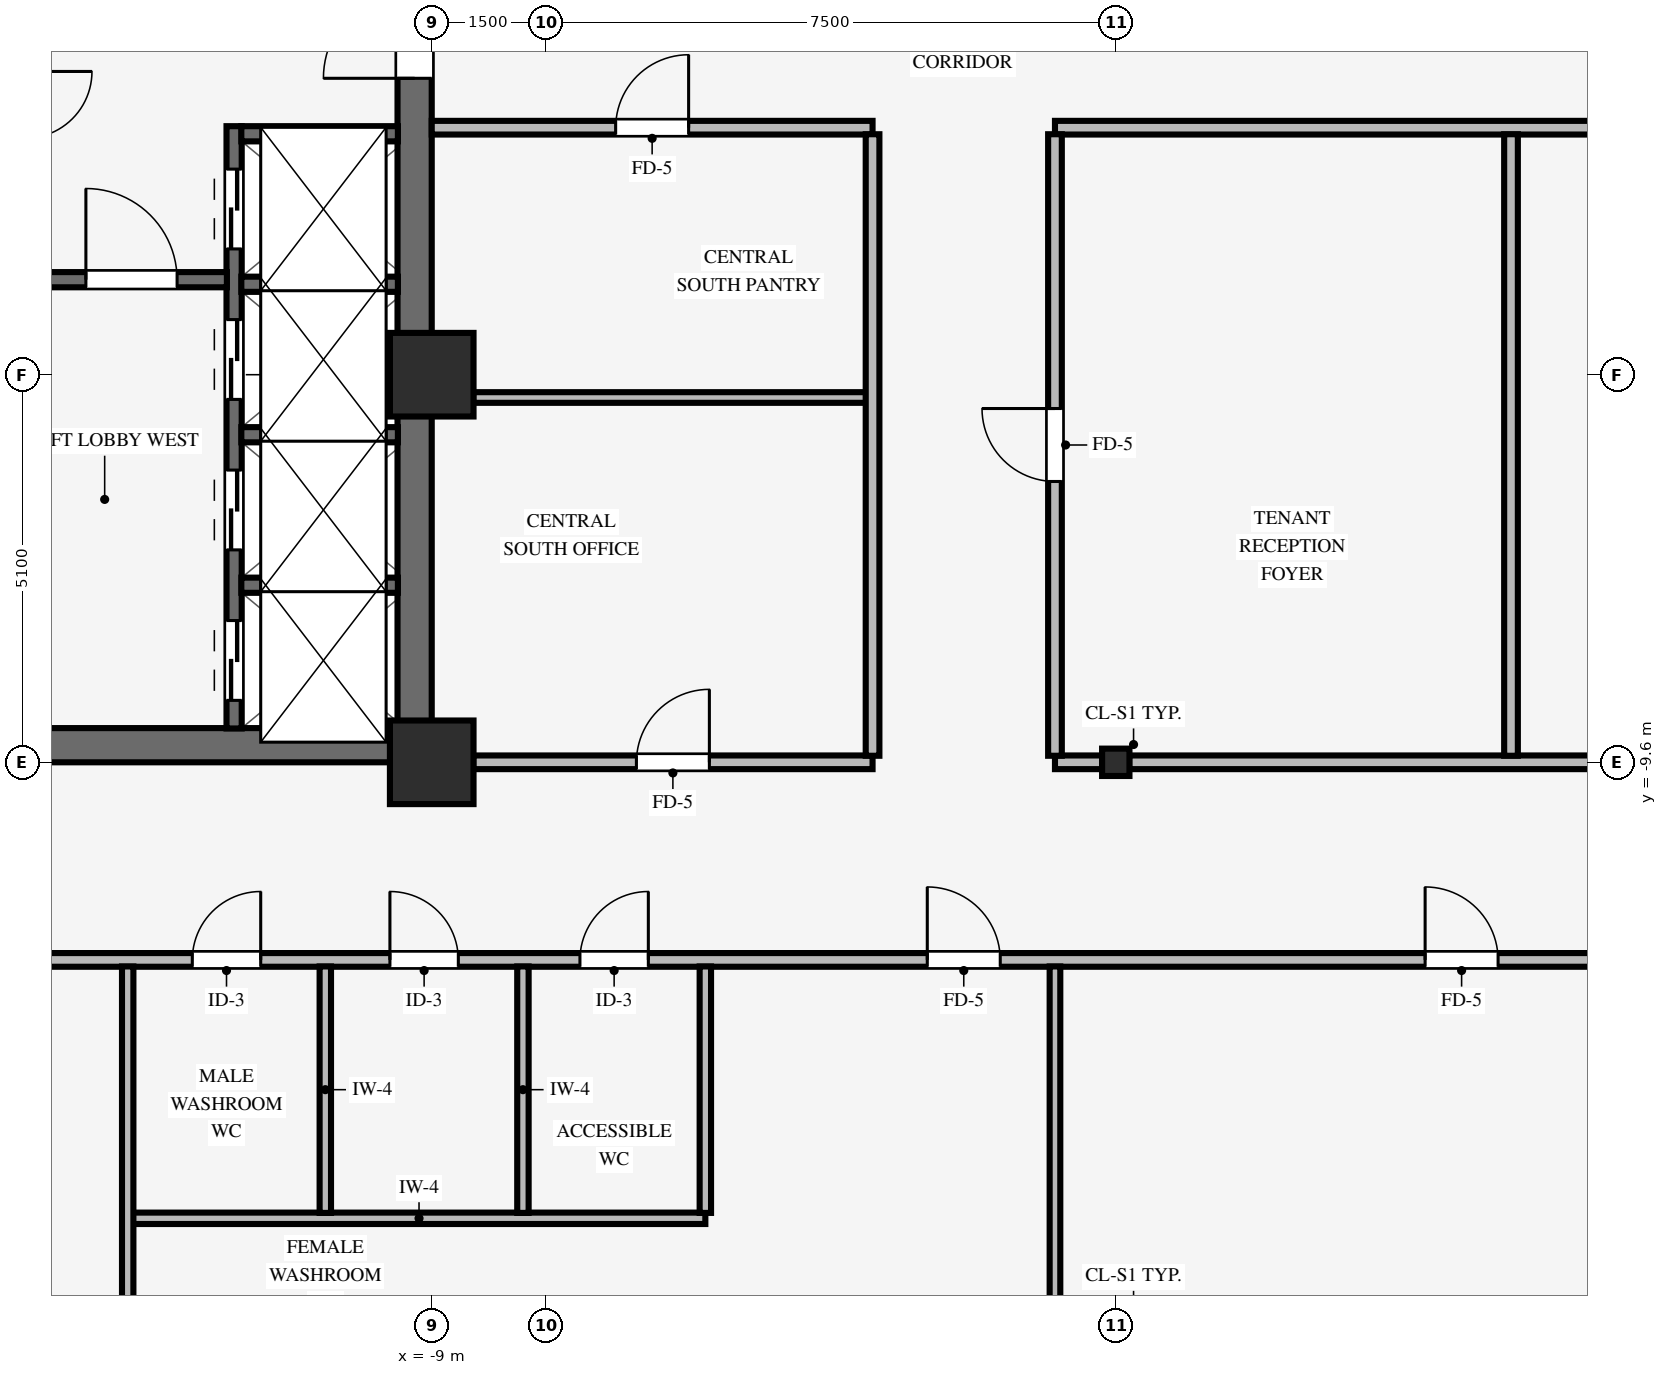
"""IFC4 building model, lengths in metres.
Left out: names, types, materials, properties, quantities, classifications, styles, units other than length and angle.
Written with IfcOpenShell. Run it as: python <this file> out.ifc"""

import sys

from ifc_helpers import new_model, si_unit, direction, frame, frame_2d, origin, origin_2d, place, context, subcontext, project, spatial, rectangle, i_section, extrude, source, transform, mapped, element, fill, save


model = new_model("IFC4")
c1 = context("Model", 3, precision=1e-05, world=origin(), true_north=direction((0.0, 1.0)))
c2 = subcontext(c1, "Body", "Model", "MODEL_VIEW")
j1 = project(units=[si_unit("LENGTHUNIT", "METRE"), si_unit("PLANEANGLEUNIT", "RADIAN")], contexts=[c1])
p1 = place(None, origin())
s1 = spatial("IfcSite", under=j1, at=p1, CompositionType="ELEMENT")
p2 = place(p1, origin())
s2 = spatial("IfcBuilding", under=s1, at=p2, CompositionType="ELEMENT")
p3 = place(p2, frame((0.0, 0.0, 82.35)))
s3 = spatial("IfcBuildingStorey", under=s2, at=p3, CompositionType="ELEMENT", Elevation=82.35)
p4 = place(p3, frame((-17.5, -9.375, 0.0), z_axis=(0.0, 0.0, 1.0), x_axis=(1.0, 0.0, 0.0)))
e1 = element("IfcWall", 1, at=p4, inside=s3, PredefinedType="SHEAR", context=c2, shape_type="SweptSolid", body=[
    extrude(rectangle(XDim=8.5, YDim=0.45, at=frame_2d((4.25, 0.0))), origin(), (0.0, 0.0, 1.0), 3.25),
])
p5 = place(p3, frame((-9.225, -9.155, 0.0), z_axis=(0.0, 0.0, 1.0), x_axis=(0.0, 1.0, 0.0)))
e2 = element("IfcWall", 2, at=p5, inside=s3, PredefinedType="SHEAR", context=c2, shape_type="SweptSolid", body=[
    extrude(rectangle(XDim=18.31, YDim=0.45, at=frame_2d((9.155, 0.0))), origin(), (0.0, 0.0, 1.0), 3.25),
])
p6 = place(p5, frame((8.555, 0.0, 0.0)))
e3 = element("IfcOpeningElement", 3, at=p6, cuts=e2, PredefinedType="OPENING", context=c2, shape_type="SweptSolid", body=[
    extrude(rectangle(XDim=1.2, YDim=2.15, at=frame_2d((0.6, 1.075))), frame((0.0, 0.235, 0.0), z_axis=(0.0, -1.0, 0.0), x_axis=(1.0, 0.0, 0.0)), (0.0, 0.0, 1.0), 0.47),
])
for number, where, z_axis, x_axis in (
    (4, (-9.0, -9.6, 0.0), (0.0, 0.0, 1.0), (1.0, 0.0, 0.0)),
    (5, (-9.0, -4.5, 0.0), (0.0, 0.0, 1.0), (1.0, 0.0, 0.0)),
):
    element("IfcColumn", number, at=place(p3, frame(where, z_axis=z_axis, x_axis=x_axis)), inside=s3, PredefinedType="COLUMN", context=c2, shape_type="SweptSolid", body=[
        extrude(rectangle(XDim=1.1, YDim=1.1, at=origin_2d()), origin(), (0.0, 0.0, 1.0), 3.25),
    ])
p7 = place(p3, frame((0.0, -9.6, 0.0), z_axis=(0.0, 0.0, 1.0), x_axis=(1.0, 0.0, 0.0)))
e6 = element("IfcColumn", 6, at=p7, inside=s3, PredefinedType="COLUMN", context=c2, shape_type="SweptSolid", body=[
    extrude(i_section(OverallWidth=0.36, OverallDepth=0.36, WebThickness=0.021, FlangeThickness=0.021, FilletRadius=0.018, at=origin_2d()), origin(), (0.0, 0.0, 1.0), 3.25),
])
p8 = place(p3, frame((-11.6, -9.155, 0.0), z_axis=(0.0, 0.0, 1.0), x_axis=(0.0, 1.0, 0.0)))
e7 = element("IfcWall", 7, at=p8, inside=s3, PredefinedType="SHEAR", context=c2, shape_type="SweptSolid", body=[
    extrude(rectangle(XDim=7.925, YDim=0.2, at=frame_2d((3.962, 0.0))), origin(), (0.0, 0.0, 1.0), 3.25),
])
p9 = place(p8, frame((0.37, 0.0, 0.0)))
e8 = element("IfcOpeningElement", 8, at=p9, cuts=e7, PredefinedType="OPENING", context=c2, shape_type="SweptSolid", body=[
    extrude(rectangle(XDim=1.05, YDim=2.15, at=frame_2d((0.525, 1.075))), frame((0.0, 0.11, 0.0), z_axis=(0.0, -1.0, 0.0), x_axis=(1.0, 0.0, 0.0)), (0.0, 0.0, 1.0), 0.22),
])
p10 = place(p8, frame((2.35, 0.0, 0.0)))
e9 = element("IfcOpeningElement", 9, at=p10, cuts=e7, PredefinedType="OPENING", context=c2, shape_type="SweptSolid", body=[
    extrude(rectangle(XDim=1.05, YDim=2.15, at=frame_2d((0.525, 1.075))), frame((0.0, 0.11, 0.0), z_axis=(0.0, -1.0, 0.0), x_axis=(1.0, 0.0, 0.0)), (0.0, 0.0, 1.0), 0.22),
])
p11 = place(p8, frame((4.33, 0.0, 0.0)))
e10 = element("IfcOpeningElement", 10, at=p11, cuts=e7, PredefinedType="OPENING", context=c2, shape_type="SweptSolid", body=[
    extrude(rectangle(XDim=1.05, YDim=2.15, at=frame_2d((0.525, 1.075))), frame((0.0, 0.11, 0.0), z_axis=(0.0, -1.0, 0.0), x_axis=(1.0, 0.0, 0.0)), (0.0, 0.0, 1.0), 0.22),
])
p12 = place(p8, frame((6.31, 0.0, 0.0)))
e11 = element("IfcOpeningElement", 11, at=p12, cuts=e7, PredefinedType="OPENING", context=c2, shape_type="SweptSolid", body=[
    extrude(rectangle(XDim=1.05, YDim=2.15, at=frame_2d((0.525, 1.075))), frame((0.0, 0.11, 0.0), z_axis=(0.0, -1.0, 0.0), x_axis=(1.0, 0.0, 0.0)), (0.0, 0.0, 1.0), 0.22),
])
p13 = place(p3, frame((-14.255, -3.25, 0.0), z_axis=(0.0, 0.0, 1.0), x_axis=(1.0, 0.0, 0.0)))
e12 = element("IfcWall", 12, at=p13, inside=s3, PredefinedType="SHEAR", context=c2, shape_type="SweptSolid", body=[
    extrude(rectangle(XDim=2.56, YDim=0.2, at=frame_2d((1.28, 0.0))), origin(), (0.0, 0.0, 1.0), 3.25),
])
p14 = place(p13, frame((0.705, 0.0, 0.0)))
e13 = element("IfcOpeningElement", 13, at=p14, cuts=e12, PredefinedType="OPENING", context=c2, shape_type="SweptSolid", body=[
    extrude(rectangle(XDim=1.2, YDim=2.15, at=frame_2d((0.6, 1.075))), frame((0.0, 0.11, 0.0), z_axis=(0.0, -1.0, 0.0), x_axis=(1.0, 0.0, 0.0)), (0.0, 0.0, 1.0), 0.22),
])
for number, where, z_axis, x_axis in (
    (14, (-11.505, -7.27, 0.0), (0.0, 0.0, 1.0), (1.0, 0.0, 0.0)),
    (15, (-11.505, -5.29, 0.0), (0.0, 0.0, 1.0), (1.0, 0.0, 0.0)),
    (16, (-11.505, -3.31, 0.0), (0.0, 0.0, 1.0), (1.0, 0.0, 0.0)),
    (17, (-11.505, -1.33, 0.0), (0.0, 0.0, 1.0), (1.0, 0.0, 0.0)),
):
    element("IfcWall", number, at=place(p3, frame(where, z_axis=z_axis, x_axis=x_axis)), inside=s3, PredefinedType="SHEAR", context=c2, shape_type="SweptSolid", body=[
        extrude(rectangle(XDim=2.06, YDim=0.2, at=frame_2d((1.03, 0.0))), origin(), (0.0, 0.0, 1.0), 3.25),
    ])
p15 = place(p3, frame((-12.934, -15.6, 0.0), z_axis=(0.0, 0.0, 1.0), x_axis=(1.0, 0.0, 0.0)))
e18 = element("IfcWall", 18, at=p15, inside=s3, PredefinedType="PARTITIONING", context=c2, shape_type="SweptSolid", body=[
    extrude(rectangle(XDim=7.534, YDim=0.15, at=frame_2d((3.767, 0.0))), origin(), (0.0, 0.0, 1.0), 3.24),
])
p16 = place(p3, frame((-15.0, -12.2, 0.0), z_axis=(0.0, 0.0, 1.0), x_axis=(1.0, 0.0, 0.0)))
e19 = element("IfcWall", 19, at=p16, inside=s3, PredefinedType="PARTITIONING", context=c2, shape_type="SweptSolid", body=[
    extrude(rectangle(XDim=30.0, YDim=0.18, at=frame_2d((15.0, 0.0))), origin(), (0.0, 0.0, 1.0), 3.24),
])
p17 = place(p16, frame((19.07, 0.0, 0.0)))
e20 = element("IfcOpeningElement", 20, at=p17, cuts=e19, PredefinedType="OPENING", context=c2, shape_type="SweptSolid", body=[
    extrude(rectangle(XDim=0.96, YDim=2.1, at=frame_2d((0.48, 1.05))), frame((0.0, 0.1, 0.0), z_axis=(0.0, -1.0, 0.0), x_axis=(1.0, 0.0, 0.0)), (0.0, 0.0, 1.0), 0.2),
])
p18 = place(p16, frame((5.45, 0.0, 0.0)))
e21 = element("IfcOpeningElement", 21, at=p18, cuts=e19, PredefinedType="OPENING", context=c2, shape_type="SweptSolid", body=[
    extrude(rectangle(XDim=0.9, YDim=2.1, at=frame_2d((0.45, 1.05))), frame((0.0, 0.1, 0.0), z_axis=(0.0, -1.0, 0.0), x_axis=(1.0, 0.0, 0.0)), (0.0, 0.0, 1.0), 0.2),
])
p19 = place(p16, frame((2.85, 0.0, 0.0)))
e22 = element("IfcOpeningElement", 22, at=p19, cuts=e19, PredefinedType="OPENING", context=c2, shape_type="SweptSolid", body=[
    extrude(rectangle(XDim=0.9, YDim=2.1, at=frame_2d((0.45, 1.05))), frame((0.0, 0.1, 0.0), z_axis=(0.0, -1.0, 0.0), x_axis=(1.0, 0.0, 0.0)), (0.0, 0.0, 1.0), 0.2),
])
p20 = place(p16, frame((12.52, 0.0, 0.0)))
e23 = element("IfcOpeningElement", 23, at=p20, cuts=e19, PredefinedType="OPENING", context=c2, shape_type="SweptSolid", body=[
    extrude(rectangle(XDim=0.96, YDim=2.1, at=frame_2d((0.48, 1.05))), frame((0.0, 0.1, 0.0), z_axis=(0.0, -1.0, 0.0), x_axis=(1.0, 0.0, 0.0)), (0.0, 0.0, 1.0), 0.2),
])
p21 = place(p16, frame((7.95, 0.0, 0.0)))
e24 = element("IfcOpeningElement", 24, at=p21, cuts=e19, PredefinedType="OPENING", context=c2, shape_type="SweptSolid", body=[
    extrude(rectangle(XDim=0.9, YDim=2.1, at=frame_2d((0.45, 1.05))), frame((0.0, 0.1, 0.0), z_axis=(0.0, -1.0, 0.0), x_axis=(1.0, 0.0, 0.0)), (0.0, 0.0, 1.0), 0.2),
])
p22 = place(p3, frame((-8.454, -9.6, 0.0), z_axis=(0.0, 0.0, 1.0), x_axis=(1.0, 0.0, 0.0)))
e25 = element("IfcWall", 25, at=p22, inside=s3, PredefinedType="PARTITIONING", context=c2, shape_type="SweptSolid", body=[
    extrude(rectangle(XDim=5.254, YDim=0.18, at=frame_2d((2.627, 0.0))), origin(), (0.0, 0.0, 1.0), 2.285),
])
p23 = place(p22, frame((2.147, 0.0, 0.0)))
e26 = element("IfcOpeningElement", 26, at=p23, cuts=e25, PredefinedType="OPENING", context=c2, shape_type="SweptSolid", body=[
    extrude(rectangle(XDim=0.96, YDim=2.1, at=frame_2d((0.48, 1.05))), frame((0.0, 0.1, 0.0), z_axis=(0.0, -1.0, 0.0), x_axis=(1.0, 0.0, 0.0)), (0.0, 0.0, 1.0), 0.2),
])
p24 = place(p3, frame((-0.8, -9.6, 0.0), z_axis=(0.0, 0.0, 1.0), x_axis=(1.0, 0.0, 0.0)))
e27 = element("IfcWall", 27, at=p24, inside=s3, PredefinedType="PARTITIONING", context=c2, shape_type="SweptSolid", body=[
    extrude(rectangle(XDim=0.624, YDim=0.18, at=frame_2d((0.312, 0.0))), origin(), (0.0, 0.0, 1.0), 2.285),
])
p25 = place(p3, frame((0.176, -9.6, 0.0), z_axis=(0.0, 0.0, 1.0), x_axis=(1.0, 0.0, 0.0)))
e28 = element("IfcWall", 28, at=p25, inside=s3, PredefinedType="PARTITIONING", context=c2, shape_type="SweptSolid", body=[
    extrude(rectangle(XDim=8.278, YDim=0.18, at=frame_2d((4.139, 0.0))), origin(), (0.0, 0.0, 1.0), 2.285),
])
p26 = place(p3, frame((-8.454, -4.8, 0.0), z_axis=(0.0, 0.0, 1.0), x_axis=(1.0, 0.0, 0.0)))
e29 = element("IfcWall", 29, at=p26, inside=s3, PredefinedType="PARTITIONING", context=c2, shape_type="SweptSolid", body=[
    extrude(rectangle(XDim=5.168, YDim=0.14, at=frame_2d((2.584, 0.0))), origin(), (0.0, 0.0, 1.0), 2.618),
])
p27 = place(p3, frame((-9.0, -1.25, 0.0), z_axis=(0.0, 0.0, 1.0), x_axis=(1.0, 0.0, 0.0)))
e30 = element("IfcWall", 30, at=p27, inside=s3, PredefinedType="PARTITIONING", context=c2, shape_type="SweptSolid", body=[
    extrude(rectangle(XDim=5.8, YDim=0.18, at=frame_2d((2.9, 0.0))), origin(), (0.0, 0.0, 1.0), 3.24),
])
p28 = place(p27, frame((2.42, 0.0, 0.0)))
e31 = element("IfcOpeningElement", 31, at=p28, cuts=e30, PredefinedType="OPENING", context=c2, shape_type="SweptSolid", body=[
    extrude(rectangle(XDim=0.96, YDim=2.1, at=frame_2d((0.48, 1.05))), frame((0.0, 0.1, 0.0), z_axis=(0.0, -1.0, 0.0), x_axis=(1.0, 0.0, 0.0)), (0.0, 0.0, 1.0), 0.2),
])
p29 = place(p3, frame((-0.8, -1.25, 0.0), z_axis=(0.0, 0.0, 1.0), x_axis=(1.0, 0.0, 0.0)))
e32 = element("IfcWall", 32, at=p29, inside=s3, PredefinedType="PARTITIONING", context=c2, shape_type="SweptSolid", body=[
    extrude(rectangle(XDim=9.8, YDim=0.18, at=frame_2d((4.9, 0.0))), origin(), (0.0, 0.0, 1.0), 3.24),
])
p30 = place(p29, frame((7.42, 0.0, 0.0)))
e33 = element("IfcOpeningElement", 33, at=p30, cuts=e32, PredefinedType="OPENING", context=c2, shape_type="SweptSolid", body=[
    extrude(rectangle(XDim=0.96, YDim=2.1, at=frame_2d((0.48, 1.05))), frame((0.0, 0.1, 0.0), z_axis=(0.0, -1.0, 0.0), x_axis=(1.0, 0.0, 0.0)), (0.0, 0.0, 1.0), 0.2),
])
p31 = place(p3, frame((-13.0, -22.86, 0.0), z_axis=(0.0, 0.0, 1.0), x_axis=(0.0, 1.0, 0.0)))
e34 = element("IfcWall", 34, at=p31, inside=s3, PredefinedType="PARTITIONING", context=c2, shape_type="SweptSolid", body=[
    extrude(rectangle(XDim=10.574, YDim=0.15, at=frame_2d((5.287, 0.0))), origin(), (0.0, 0.0, 1.0), 3.24),
])
for number, where, z_axis, x_axis in (
    (35, (-10.4, -15.529, 0.0), (0.0, 0.0, 1.0), (0.0, 1.0, 0.0)),
    (36, (-7.8, -15.529, 0.0), (0.0, 0.0, 1.0), (0.0, 1.0, 0.0)),
    (37, (-5.4, -15.529, 0.0), (0.0, 0.0, 1.0), (0.0, 1.0, 0.0)),
):
    element("IfcWall", number, at=place(p3, frame(where, z_axis=z_axis, x_axis=x_axis)), inside=s3, PredefinedType="PARTITIONING", context=c2, shape_type="SweptSolid", body=[
        extrude(rectangle(XDim=3.243, YDim=0.15, at=frame_2d((1.622, 0.0))), origin(), (0.0, 0.0, 1.0), 3.24),
    ])
p32 = place(p3, frame((-3.2, -9.514, 0.0), z_axis=(0.0, 0.0, 1.0), x_axis=(0.0, 1.0, 0.0)))
e38 = element("IfcWall", 38, at=p32, inside=s3, PredefinedType="PARTITIONING", context=c2, shape_type="SweptSolid", body=[
    extrude(rectangle(XDim=8.178, YDim=0.18, at=frame_2d((4.089, 0.0))), origin(), (0.0, 0.0, 1.0), 3.24),
])
p33 = place(p3, frame((-0.8, -22.86, 0.0), z_axis=(0.0, 0.0, 1.0), x_axis=(0.0, 1.0, 0.0)))
e39 = element("IfcWall", 39, at=p33, inside=s3, PredefinedType="PARTITIONING", context=c2, shape_type="SweptSolid", body=[
    extrude(rectangle(XDim=10.574, YDim=0.14, at=frame_2d((5.287, 0.0))), origin(), (0.0, 0.0, 1.0), 3.24),
])
p34 = place(p3, frame((-0.8, -9.514, 0.0), z_axis=(0.0, 0.0, 1.0), x_axis=(0.0, 1.0, 0.0)))
e40 = element("IfcWall", 40, at=p34, inside=s3, PredefinedType="PARTITIONING", context=c2, shape_type="SweptSolid", body=[
    extrude(rectangle(XDim=8.178, YDim=0.18, at=frame_2d((4.089, 0.0))), origin(), (0.0, 0.0, 1.0), 3.24),
])
p35 = place(p34, frame((3.609, 0.0, 0.0)))
e41 = element("IfcOpeningElement", 41, at=p35, cuts=e40, PredefinedType="OPENING", context=c2, shape_type="SweptSolid", body=[
    extrude(rectangle(XDim=0.96, YDim=2.1, at=frame_2d((0.48, 1.05))), frame((0.0, 0.1, 0.0), z_axis=(0.0, -1.0, 0.0), x_axis=(1.0, 0.0, 0.0)), (0.0, 0.0, 1.0), 0.2),
])
p36 = place(p3, frame((5.2, -9.514, 0.0), z_axis=(0.0, 0.0, 1.0), x_axis=(0.0, 1.0, 0.0)))
e42 = element("IfcWall", 42, at=p36, inside=s3, PredefinedType="PARTITIONING", context=c2, shape_type="SweptSolid", body=[
    extrude(rectangle(XDim=8.178, YDim=0.18, at=frame_2d((4.089, 0.0))), origin(), (0.0, 0.0, 1.0), 3.24),
])
m1 = source(origin(), c2, "Body", "SweptSolid", [
    extrude(rectangle(XDim=1.2, YDim=2.15, at=frame_2d((0.6, 1.075))), frame((0.0, 0.025, 0.0), z_axis=(0.0, -1.0, 0.0), x_axis=(1.0, 0.0, 0.0)), (0.0, 0.0, 1.0), 0.05),
])
p37 = place(p14, origin())
e43 = element("IfcDoor", 43, at=p37, inside=s3, OperationType="SINGLE_SWING_LEFT", PredefinedType="DOOR", context=c2, shape_type="MappedRepresentation", body=[
    mapped(m1, transform((0.0, 0.0, 0.0), scale=1.0)),
])
fill(e13, e43)
p38 = place(p6, origin())
e44 = element("IfcDoor", 44, at=p38, inside=s3, OperationType="SINGLE_SWING_LEFT", PredefinedType="DOOR", context=c2, shape_type="MappedRepresentation", body=[
    mapped(m1, transform((0.0, 0.0, 0.0), scale=1.0)),
])
fill(e3, e44)
m2 = source(origin(), c2, "Body", "SweptSolid", [
    extrude(rectangle(XDim=1.05, YDim=2.15, at=frame_2d((0.525, 1.075))), frame((0.0, 0.025, 0.0), z_axis=(0.0, -1.0, 0.0), x_axis=(1.0, 0.0, 0.0)), (0.0, 0.0, 1.0), 0.05),
])
p39 = place(p9, origin())
e45 = element("IfcDoor", 45, at=p39, inside=s3, OperationType="DOUBLE_DOOR_SLIDING", PredefinedType="DOOR", context=c2, shape_type="MappedRepresentation", body=[
    mapped(m2, transform((0.0, 0.0, 0.0), scale=1.0)),
])
fill(e8, e45)
p40 = place(p10, origin())
e46 = element("IfcDoor", 46, at=p40, inside=s3, OperationType="DOUBLE_DOOR_SLIDING", PredefinedType="DOOR", context=c2, shape_type="MappedRepresentation", body=[
    mapped(m2, transform((0.0, 0.0, 0.0), scale=1.0)),
])
fill(e9, e46)
p41 = place(p11, origin())
e47 = element("IfcDoor", 47, at=p41, inside=s3, OperationType="DOUBLE_DOOR_SLIDING", PredefinedType="DOOR", context=c2, shape_type="MappedRepresentation", body=[
    mapped(m2, transform((0.0, 0.0, 0.0), scale=1.0)),
])
fill(e10, e47)
p42 = place(p12, origin())
e48 = element("IfcDoor", 48, at=p42, inside=s3, OperationType="DOUBLE_DOOR_SLIDING", PredefinedType="DOOR", context=c2, shape_type="MappedRepresentation", body=[
    mapped(m2, transform((0.0, 0.0, 0.0), scale=1.0)),
])
fill(e11, e48)
m3 = source(origin(), c2, "Body", "SweptSolid", [
    extrude(rectangle(XDim=0.96, YDim=2.1, at=frame_2d((0.48, 1.05))), frame((0.0, 0.025, 0.0), z_axis=(0.0, -1.0, 0.0), x_axis=(1.0, 0.0, 0.0)), (0.0, 0.0, 1.0), 0.05),
])
p43 = place(p17, origin())
e49 = element("IfcDoor", 49, at=p43, inside=s3, OperationType="SINGLE_SWING_LEFT", PredefinedType="DOOR", context=c2, shape_type="MappedRepresentation", body=[
    mapped(m3, transform((0.0, 0.0, 0.0), scale=1.0)),
])
fill(e20, e49)
p44 = place(p35, origin())
e50 = element("IfcDoor", 50, at=p44, inside=s3, OperationType="SINGLE_SWING_RIGHT", PredefinedType="DOOR", context=c2, shape_type="MappedRepresentation", body=[
    mapped(m3, transform((0.0, 0.0, 0.0), scale=1.0)),
])
fill(e41, e50)
p45 = place(p28, origin())
e51 = element("IfcDoor", 51, at=p45, inside=s3, OperationType="SINGLE_SWING_RIGHT", PredefinedType="DOOR", context=c2, shape_type="MappedRepresentation", body=[
    mapped(m3, transform((0.0, 0.0, 0.0), scale=1.0)),
])
fill(e31, e51)
p46 = place(p23, origin())
e52 = element("IfcDoor", 52, at=p46, inside=s3, OperationType="SINGLE_SWING_RIGHT", PredefinedType="DOOR", context=c2, shape_type="MappedRepresentation", body=[
    mapped(m3, transform((0.0, 0.0, 0.0), scale=1.0)),
])
fill(e26, e52)
m4 = source(origin(), c2, "Body", "SweptSolid", [
    extrude(rectangle(XDim=0.9, YDim=2.1, at=frame_2d((0.45, 1.05))), frame((0.0, 0.025, 0.0), z_axis=(0.0, -1.0, 0.0), x_axis=(1.0, 0.0, 0.0)), (0.0, 0.0, 1.0), 0.05),
])
p47 = place(p18, origin())
e53 = element("IfcDoor", 53, at=p47, inside=s3, OperationType="SINGLE_SWING_LEFT", PredefinedType="DOOR", context=c2, shape_type="MappedRepresentation", body=[
    mapped(m4, transform((0.0, 0.0, 0.0), scale=1.0)),
])
fill(e21, e53)
p48 = place(p19, origin())
e54 = element("IfcDoor", 54, at=p48, inside=s3, OperationType="SINGLE_SWING_RIGHT", PredefinedType="DOOR", context=c2, shape_type="MappedRepresentation", body=[
    mapped(m4, transform((0.0, 0.0, 0.0), scale=1.0)),
])
fill(e22, e54)
p49 = place(p20, origin())
e55 = element("IfcDoor", 55, at=p49, inside=s3, OperationType="SINGLE_SWING_LEFT", PredefinedType="DOOR", context=c2, shape_type="MappedRepresentation", body=[
    mapped(m3, transform((0.0, 0.0, 0.0), scale=1.0)),
])
fill(e23, e55)
p50 = place(p21, origin())
e56 = element("IfcDoor", 56, at=p50, inside=s3, OperationType="SINGLE_SWING_RIGHT", PredefinedType="DOOR", context=c2, shape_type="MappedRepresentation", body=[
    mapped(m4, transform((0.0, 0.0, 0.0), scale=1.0)),
])
fill(e24, e56)
save(model, sys.argv[1])
